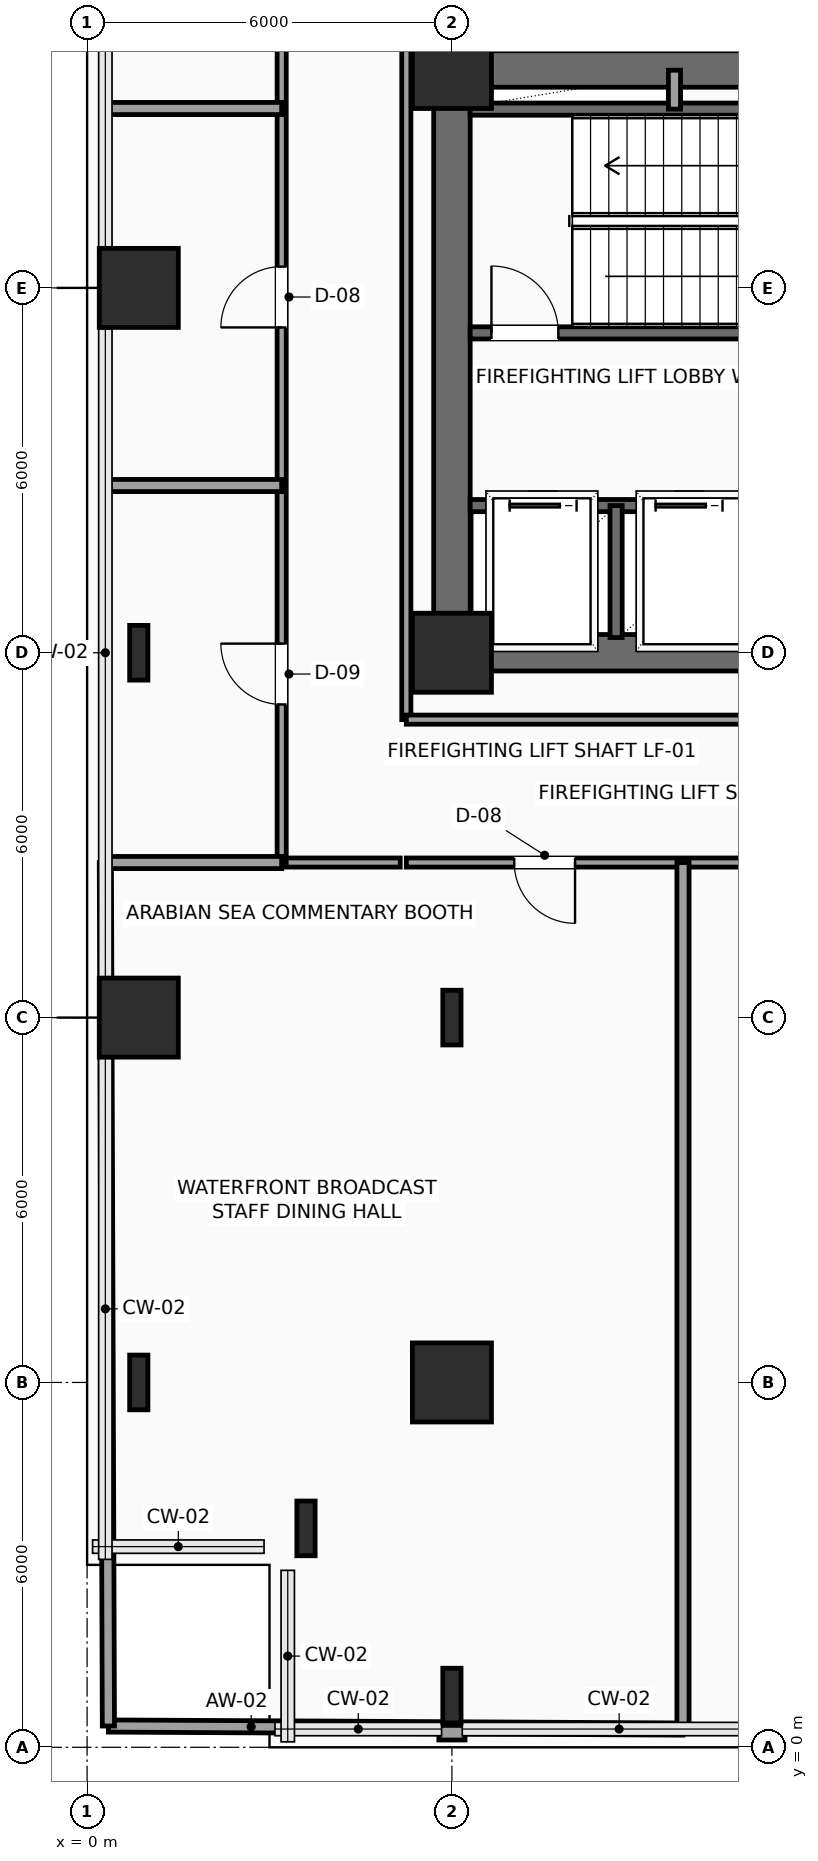
"""IFC4 building model, lengths in metres.
Left out: names, types, materials, properties, quantities, classifications, styles, units other than length and angle.
Written with IfcOpenShell. Run it as: python <this file> out.ifc"""

import sys

from ifc_helpers import new_model, si_unit, direction, frame, frame_2d, origin, origin_2d, place, context, subcontext, project, spatial, rectangle, i_section, extrude, element, fill, save


model = new_model("IFC4")
c1 = context("Model", 3, precision=1e-05, world=origin(), true_north=direction((0.0, 1.0)))
c2 = subcontext(c1, "Body", "Model", "MODEL_VIEW")
j1 = project(units=[si_unit("LENGTHUNIT", "METRE"), si_unit("PLANEANGLEUNIT", "RADIAN")], contexts=[c1])
p1 = place(None, origin())
s1 = spatial("IfcSite", under=j1, at=p1, CompositionType="ELEMENT")
p2 = place(p1, origin())
s2 = spatial("IfcBuilding", under=s1, at=p2, CompositionType="ELEMENT")
p3 = place(p2, frame((0.0, 0.0, 75.3)))
s3 = spatial("IfcBuildingStorey", under=s2, at=p3, CompositionType="ELEMENT", Elevation=75.3)
for number, where, z_axis, x_axis in (
    (1, (6.0, 18.0, 0.0), (0.0, 0.0, 1.0), (1.0, 0.0, 0.0)),
    (2, (6.0, 27.6, 0.0), (0.0, 0.0, 1.0), (1.0, 0.0, 0.0)),
):
    element("IfcColumn", number, at=place(p3, frame(where, z_axis=z_axis, x_axis=x_axis)), inside=s3, PredefinedType="COLUMN", context=c2, shape_type="SweptSolid", body=[
        extrude(rectangle(XDim=1.3, YDim=1.3, at=origin_2d()), origin(), (0.0, 0.0, 1.0), 3.9),
    ])
for number, where, z_axis, x_axis in (
    (3, (3.6, 3.6, 0.0), (0.0, 0.0, 1.0), (1.0, 0.0, 0.0)),
    (4, (0.85, 6.0, 0.0), (0.0, 0.0, 1.0), (1.0, 0.0, 0.0)),
):
    element("IfcColumn", number, at=place(p3, frame(where, z_axis=z_axis, x_axis=x_axis)), inside=s3, PredefinedType="COLUMN", context=c2, shape_type="SweptSolid", body=[
        extrude(i_section(OverallWidth=0.3, OverallDepth=0.9, WebThickness=0.019, FlangeThickness=0.035, FilletRadius=0.03, at=origin_2d()), origin(), (0.0, 0.0, 1.0), 3.9),
    ])
p4 = place(p3, frame((0.85, 12.0, 0.0), z_axis=(0.0, 0.0, 1.0), x_axis=(1.0, 0.0, 0.0)))
e5 = element("IfcColumn", 5, at=p4, inside=s3, PredefinedType="COLUMN", context=c2, shape_type="SweptSolid", body=[
    extrude(rectangle(XDim=1.3, YDim=1.3, at=origin_2d()), origin(), (0.0, 0.0, 1.0), 3.9),
])
p5 = place(p3, frame((0.85, 18.0, 0.0), z_axis=(0.0, 0.0, 1.0), x_axis=(1.0, 0.0, 0.0)))
e6 = element("IfcColumn", 6, at=p5, inside=s3, PredefinedType="COLUMN", context=c2, shape_type="SweptSolid", body=[
    extrude(i_section(OverallWidth=0.3, OverallDepth=0.9, WebThickness=0.019, FlangeThickness=0.035, FilletRadius=0.03, at=origin_2d()), origin(), (0.0, 0.0, 1.0), 3.9),
])
p6 = place(p3, frame((0.85, 24.0, 0.0), z_axis=(0.0, 0.0, 1.0), x_axis=(1.0, 0.0, 0.0)))
e7 = element("IfcColumn", 7, at=p6, inside=s3, PredefinedType="COLUMN", context=c2, shape_type="SweptSolid", body=[
    extrude(rectangle(XDim=1.3, YDim=1.3, at=origin_2d()), origin(), (0.0, 0.0, 1.0), 3.9),
])
p7 = place(p3, frame((6.0, 0.85, 0.0), z_axis=(0.0, 0.0, 1.0), x_axis=(1.0, 0.0, 0.0)))
e8 = element("IfcColumn", 8, at=p7, inside=s3, PredefinedType="COLUMN", context=c2, shape_type="SweptSolid", body=[
    extrude(i_section(OverallWidth=0.3, OverallDepth=0.9, WebThickness=0.019, FlangeThickness=0.035, FilletRadius=0.03, at=origin_2d()), origin(), (0.0, 0.0, 1.0), 3.9),
])
p8 = place(p3, frame((6.0, 6.0, 0.0), z_axis=(0.0, 0.0, 1.0), x_axis=(1.0, 0.0, 0.0)))
e9 = element("IfcColumn", 9, at=p8, inside=s3, PredefinedType="COLUMN", context=c2, shape_type="SweptSolid", body=[
    extrude(rectangle(XDim=1.3, YDim=1.3, at=origin_2d()), origin(), (0.0, 0.0, 1.0), 3.9),
])
p9 = place(p3, frame((6.0, 12.0, 0.0), z_axis=(0.0, 0.0, 1.0), x_axis=(1.0, 0.0, 0.0)))
e10 = element("IfcColumn", 10, at=p9, inside=s3, PredefinedType="COLUMN", context=c2, shape_type="SweptSolid", body=[
    extrude(i_section(OverallWidth=0.3, OverallDepth=0.9, WebThickness=0.019, FlangeThickness=0.035, FilletRadius=0.03, at=origin_2d()), origin(), (0.0, 0.0, 1.0), 3.9),
])
p10 = place(p3, frame((6.215, 0.24, 0.0), z_axis=(0.0, 0.0, 1.0), x_axis=(-1.0, 0.0, 0.0)))
e11 = element("IfcWall", 11, at=p10, inside=s3, PredefinedType="SOLIDWALL", context=c2, shape_type="SweptSolid", body=[
    extrude(rectangle(XDim=0.43, YDim=0.24, at=frame_2d((0.215, 0.0))), origin(), (0.0, 0.0, 1.0), 3.65),
])
p11 = place(p3, frame((6.0, 18.0, 0.0), z_axis=(0.0, 0.0, 1.0), x_axis=(1.0, 0.0, 0.0)))
e12 = element("IfcWall", 12, at=p11, inside=s3, PredefinedType="SHEAR", context=c2, shape_type="SweptSolid", body=[
    extrude(rectangle(XDim=12.0, YDim=0.6, at=frame_2d((6.0, 0.0))), origin(), (0.0, 0.0, 1.0), 3.65),
])
p12 = place(p11, frame((7.15, 0.0, 0.0)))
e13 = element("IfcOpeningElement", 13, at=p12, cuts=e12, PredefinedType="OPENING", context=c2, shape_type="SweptSolid", body=[
    extrude(rectangle(XDim=1.6, YDim=2.3, at=frame_2d((0.8, 1.15))), frame((0.0, 0.31, 0.0), z_axis=(0.0, -1.0, 0.0), x_axis=(1.0, 0.0, 0.0)), (0.0, 0.0, 1.0), 0.62),
])
p13 = place(p3, frame((6.0, 27.6, 0.0), z_axis=(0.0, 0.0, 1.0), x_axis=(1.0, 0.0, 0.0)))
e14 = element("IfcWall", 14, at=p13, inside=s3, PredefinedType="SHEAR", context=c2, shape_type="SweptSolid", body=[
    extrude(rectangle(XDim=12.0, YDim=0.6, at=frame_2d((6.0, 0.0))), origin(), (0.0, 0.0, 1.0), 3.65),
])
p14 = place(p13, frame((10.2, 0.0, 0.0)))
e15 = element("IfcOpeningElement", 15, at=p14, cuts=e14, PredefinedType="OPENING", context=c2, shape_type="SweptSolid", body=[
    extrude(rectangle(XDim=0.9, YDim=2.15, at=frame_2d((0.45, 1.075))), frame((0.0, 0.31, 0.0), z_axis=(0.0, -1.0, 0.0), x_axis=(1.0, 0.0, 0.0)), (0.0, 0.0, 1.0), 0.62),
])
p15 = place(p3, frame((6.0, 18.0, 0.0), z_axis=(0.0, 0.0, 1.0), x_axis=(0.0, 1.0, 0.0)))
e16 = element("IfcWall", 16, at=p15, inside=s3, PredefinedType="SHEAR", context=c2, shape_type="SweptSolid", body=[
    extrude(rectangle(XDim=9.6, YDim=0.6, at=frame_2d((4.8, 0.0))), origin(), (0.0, 0.0, 1.0), 3.65),
])
p16 = place(p3, frame((6.3, 23.26, 0.0), z_axis=(0.0, 0.0, 1.0), x_axis=(1.0, 0.0, 0.0)))
e17 = element("IfcWall", 17, at=p16, inside=s3, PredefinedType="SHEAR", context=c2, shape_type="SweptSolid", body=[
    extrude(rectangle(XDim=8.88, YDim=0.2, at=frame_2d((4.44, 0.0))), origin(), (0.0, 0.0, 1.0), 3.65),
])
p17 = place(p16, frame((0.35, 0.0, 0.0)))
e18 = element("IfcOpeningElement", 18, at=p17, cuts=e17, PredefinedType="OPENING", context=c2, shape_type="SweptSolid", body=[
    extrude(rectangle(XDim=1.1, YDim=2.2, at=frame_2d((0.55, 1.1))), frame((0.0, 0.11, 0.0), z_axis=(0.0, -1.0, 0.0), x_axis=(1.0, 0.0, 0.0)), (0.0, 0.0, 1.0), 0.22),
])
p18 = place(p3, frame((6.3, 26.94, 0.0), z_axis=(0.0, 0.0, 1.0), x_axis=(1.0, 0.0, 0.0)))
e19 = element("IfcWall", 19, at=p18, inside=s3, PredefinedType="SHEAR", context=c2, shape_type="SweptSolid", body=[
    extrude(rectangle(XDim=8.88, YDim=0.2, at=frame_2d((4.44, 0.0))), origin(), (0.0, 0.0, 1.0), 3.65),
])
p19 = place(p3, frame((6.3, 20.42, 0.0), z_axis=(0.0, 0.0, 1.0), x_axis=(1.0, 0.0, 0.0)))
e20 = element("IfcWall", 20, at=p19, inside=s3, PredefinedType="SHEAR", context=c2, shape_type="SweptSolid", body=[
    extrude(rectangle(XDim=4.95, YDim=0.2, at=frame_2d((2.475, 0.0))), origin(), (0.0, 0.0, 1.0), 3.65),
])
p20 = place(p19, frame((0.65, 0.0, 0.0)))
e21 = element("IfcOpeningElement", 21, at=p20, cuts=e20, PredefinedType="OPENING", context=c2, shape_type="SweptSolid", body=[
    extrude(rectangle(XDim=1.1, YDim=2.2, at=frame_2d((0.55, 1.1))), frame((0.0, 0.11, 0.0), z_axis=(0.0, -1.0, 0.0), x_axis=(1.0, 0.0, 0.0)), (0.0, 0.0, 1.0), 0.22),
])
p21 = place(p19, frame((3.05, 0.0, 0.0)))
e22 = element("IfcOpeningElement", 22, at=p21, cuts=e20, PredefinedType="OPENING", context=c2, shape_type="SweptSolid", body=[
    extrude(rectangle(XDim=1.1, YDim=2.2, at=frame_2d((0.55, 1.1))), frame((0.0, 0.11, 0.0), z_axis=(0.0, -1.0, 0.0), x_axis=(1.0, 0.0, 0.0)), (0.0, 0.0, 1.0), 0.22),
])
p22 = place(p3, frame((8.7, 18.25, 0.0), z_axis=(0.0, 0.0, 1.0), x_axis=(0.0, 1.0, 0.0)))
e23 = element("IfcWall", 23, at=p22, inside=s3, PredefinedType="SHEAR", context=c2, shape_type="SweptSolid", body=[
    extrude(rectangle(XDim=2.17, YDim=0.2, at=frame_2d((1.085, 0.0))), origin(), (0.0, 0.0, 1.0), 3.65),
])
p23 = place(p3, frame((9.66, 26.94, 0.0), z_axis=(0.0, 0.0, 1.0), x_axis=(0.0, 1.0, 0.0)))
e24 = element("IfcWall", 24, at=p23, inside=s3, PredefinedType="SOLIDWALL", context=c2, shape_type="SweptSolid", body=[
    extrude(rectangle(XDim=0.64, YDim=0.2, at=frame_2d((0.32, 0.0))), origin(), (0.0, 0.0, 1.0), 3.65),
])
p24 = place(p3, frame((12.4, 14.55, 0.0), z_axis=(0.0, 0.0, 1.0), x_axis=(-1.0, 0.0, 0.0)))
e25 = element("IfcWall", 25, at=p24, inside=s3, PredefinedType="PARTITIONING", context=c2, shape_type="SweptSolid", body=[
    extrude(rectangle(XDim=7.15, YDim=0.15, at=frame_2d((3.575, 0.0))), origin(), (0.0, 0.0, 1.0), 3.65),
])
p25 = place(p24, frame((4.375, 0.0, 0.0)))
e26 = element("IfcOpeningElement", 26, at=p25, cuts=e25, PredefinedType="OPENING", context=c2, shape_type="SweptSolid", body=[
    extrude(rectangle(XDim=1.0, YDim=2.2, at=frame_2d((0.5, 1.1))), frame((0.0, 0.085, 0.0), z_axis=(0.0, -1.0, 0.0), x_axis=(1.0, 0.0, 0.0)), (0.0, 0.0, 1.0), 0.17),
])
p26 = place(p3, frame((5.15, 14.55, 0.0), z_axis=(0.0, 0.0, 1.0), x_axis=(-1.0, 0.0, 0.0)))
e27 = element("IfcWall", 27, at=p26, inside=s3, PredefinedType="PARTITIONING", context=c2, shape_type="SweptSolid", body=[
    extrude(rectangle(XDim=1.95, YDim=0.15, at=frame_2d((0.975, 0.0))), origin(), (0.0, 0.0, 1.0), 3.65),
])
p27 = place(p3, frame((3.2, 14.55, 0.0), z_axis=(0.0, 0.0, 1.0), x_axis=(0.0, 1.0, 0.0)))
e28 = element("IfcWall", 28, at=p27, inside=s3, PredefinedType="PARTITIONING", context=c2, shape_type="SweptSolid", body=[
    extrude(rectangle(XDim=15.7, YDim=0.15, at=frame_2d((7.85, 0.0))), origin(), (0.0, 0.0, 1.0), 3.65),
])
p28 = place(p27, frame((2.6, 0.0, 0.0)))
e29 = element("IfcOpeningElement", 29, at=p28, cuts=e28, PredefinedType="OPENING", context=c2, shape_type="SweptSolid", body=[
    extrude(rectangle(XDim=1.0, YDim=2.2, at=frame_2d((0.5, 1.1))), frame((0.0, 0.085, 0.0), z_axis=(0.0, -1.0, 0.0), x_axis=(1.0, 0.0, 0.0)), (0.0, 0.0, 1.0), 0.17),
])
p29 = place(p27, frame((8.8, 0.0, 0.0)))
e30 = element("IfcOpeningElement", 30, at=p29, cuts=e28, PredefinedType="OPENING", context=c2, shape_type="SweptSolid", body=[
    extrude(rectangle(XDim=1.0, YDim=2.2, at=frame_2d((0.5, 1.1))), frame((0.0, 0.085, 0.0), z_axis=(0.0, -1.0, 0.0), x_axis=(1.0, 0.0, 0.0)), (0.0, 0.0, 1.0), 0.17),
])
p30 = place(p27, frame((13.55, 0.0, 0.0)))
e31 = element("IfcOpeningElement", 31, at=p30, cuts=e28, PredefinedType="OPENING", context=c2, shape_type="SweptSolid", body=[
    extrude(rectangle(XDim=1.0, YDim=2.2, at=frame_2d((0.5, 1.1))), frame((0.0, 0.085, 0.0), z_axis=(0.0, -1.0, 0.0), x_axis=(1.0, 0.0, 0.0)), (0.0, 0.0, 1.0), 0.17),
])
p31 = place(p3, frame((5.25, 30.25, 0.0), z_axis=(0.0, 0.0, 1.0), x_axis=(0.0, -1.0, 0.0)))
e32 = element("IfcWall", 32, at=p31, inside=s3, PredefinedType="PARTITIONING", context=c2, shape_type="SweptSolid", body=[
    extrude(rectangle(XDim=13.35, YDim=0.15, at=frame_2d((6.675, 0.0))), origin(), (0.0, 0.0, 1.0), 3.65),
])
p32 = place(p3, frame((5.25, 16.9, 0.0), z_axis=(0.0, 0.0, 1.0), x_axis=(1.0, 0.0, 0.0)))
e33 = element("IfcWall", 33, at=p32, inside=s3, PredefinedType="PARTITIONING", context=c2, shape_type="SweptSolid", body=[
    extrude(rectangle(XDim=7.15, YDim=0.15, at=frame_2d((3.575, 0.0))), origin(), (0.0, 0.0, 1.0), 3.65),
])
p33 = place(p3, frame((6.3, 27.68, 0.0), z_axis=(0.0, 0.0, 1.0), x_axis=(0.0, 1.0, 0.0)))
e34 = element("IfcWall", 34, at=p33, inside=s3, PredefinedType="PARTITIONING", context=c2, shape_type="SweptSolid", body=[
    extrude(rectangle(XDim=2.57, YDim=0.15, at=frame_2d((1.285, 0.0))), origin(), (0.0, 0.0, 1.0), 2.992),
])
p34 = place(p3, frame((0.35, 0.35, 0.0), z_axis=(0.0, 0.0, 1.0), x_axis=(0.99998595132, -0.005300675722, 0.0)))
e35 = element("IfcWall", 35, at=p34, inside=s3, PredefinedType="PARTITIONING", context=c2, shape_type="SweptSolid", body=[
    extrude(rectangle(XDim=5.435, YDim=0.2, at=frame_2d((2.717, 0.0))), origin(), (0.0, 0.0, 1.0), 3.65),
])
p35 = place(p3, frame((6.215, 0.319, 0.0), z_axis=(0.0, 0.0, 1.0), x_axis=(0.999985892136, -0.005311829174, 0.0)))
e36 = element("IfcWall", 36, at=p35, inside=s3, PredefinedType="PARTITIONING", context=c2, shape_type="SweptSolid", body=[
    extrude(rectangle(XDim=3.585, YDim=0.2, at=frame_2d((1.792, 0.0))), origin(), (0.0, 0.0, 1.0), 3.65),
])
p36 = place(p3, frame((0.35, 0.35, 0.0), z_axis=(0.0, 0.0, 1.0), x_axis=(-0.003524555588, 0.999993788735, 0.0)))
e37 = element("IfcWall", 37, at=p36, inside=s3, PredefinedType="PARTITIONING", context=c2, shape_type="SweptSolid", body=[
    extrude(rectangle(XDim=14.2, YDim=0.2, at=frame_2d((7.1, 0.0))), origin(), (0.0, 0.0, 1.0), 3.65),
])
p37 = place(p3, frame((9.8, 0.3, 0.0), z_axis=(0.0, 0.0, 1.0), x_axis=(0.0, 1.0, 0.0)))
e38 = element("IfcWall", 38, at=p37, inside=s3, PredefinedType="PARTITIONING", context=c2, shape_type="SweptSolid", body=[
    extrude(rectangle(XDim=14.25, YDim=0.2, at=frame_2d((7.125, 0.0))), origin(), (0.0, 0.0, 1.0), 3.65),
])
p38 = place(p3, frame((0.3, 14.55, 0.0), z_axis=(0.0, 0.0, 1.0), x_axis=(1.0, 0.0, 0.0)))
e39 = element("IfcWall", 39, at=p38, inside=s3, PredefinedType="PARTITIONING", context=c2, shape_type="SweptSolid", body=[
    extrude(rectangle(XDim=2.9, YDim=0.2, at=frame_2d((1.45, 0.0))), origin(), (0.0, 0.0, 1.0), 3.65),
])
p39 = place(p3, frame((0.3, 20.75, 0.0), z_axis=(0.0, 0.0, 1.0), x_axis=(1.0, 0.0, 0.0)))
e40 = element("IfcWall", 40, at=p39, inside=s3, PredefinedType="PARTITIONING", context=c2, shape_type="SweptSolid", body=[
    extrude(rectangle(XDim=2.9, YDim=0.2, at=frame_2d((1.45, 0.0))), origin(), (0.0, 0.0, 1.0), 3.142),
])
p40 = place(p3, frame((0.3, 26.95, 0.0), z_axis=(0.0, 0.0, 1.0), x_axis=(1.0, 0.0, 0.0)))
e41 = element("IfcWall", 41, at=p40, inside=s3, PredefinedType="PARTITIONING", context=c2, shape_type="SweptSolid", body=[
    extrude(rectangle(XDim=2.9, YDim=0.2, at=frame_2d((1.45, 0.0))), origin(), (0.0, 0.0, 1.0), 3.65),
])
p41 = place(p17, origin())
e42 = element("IfcDoor", 42, at=p41, inside=s3, OperationType="SINGLE_SWING_LEFT", PredefinedType="DOOR", context=c2, shape_type="SweptSolid", body=[
    extrude(rectangle(XDim=1.1, YDim=2.2, at=frame_2d((0.55, 1.1))), frame((0.0, 0.025, 0.0), z_axis=(0.0, -1.0, 0.0), x_axis=(1.0, 0.0, 0.0)), (0.0, 0.0, 1.0), 0.05),
])
fill(e18, e42)
p42 = place(p20, origin())
e43 = element("IfcDoor", 43, at=p42, inside=s3, OperationType="SLIDING_TO_LEFT", PredefinedType="DOOR", context=c2, shape_type="SweptSolid", body=[
    extrude(rectangle(XDim=1.1, YDim=2.2, at=frame_2d((0.55, 1.1))), frame((0.0, 0.025, 0.0), z_axis=(0.0, -1.0, 0.0), x_axis=(1.0, 0.0, 0.0)), (0.0, 0.0, 1.0), 0.05),
])
fill(e21, e43)
p43 = place(p21, origin())
e44 = element("IfcDoor", 44, at=p43, inside=s3, OperationType="SLIDING_TO_LEFT", PredefinedType="DOOR", context=c2, shape_type="SweptSolid", body=[
    extrude(rectangle(XDim=1.1, YDim=2.2, at=frame_2d((0.55, 1.1))), frame((0.0, 0.025, 0.0), z_axis=(0.0, -1.0, 0.0), x_axis=(1.0, 0.0, 0.0)), (0.0, 0.0, 1.0), 0.05),
])
fill(e22, e44)
p44 = place(p25, origin())
e45 = element("IfcDoor", 45, at=p44, inside=s3, OperationType="SINGLE_SWING_LEFT", PredefinedType="DOOR", context=c2, shape_type="SweptSolid", body=[
    extrude(rectangle(XDim=1.0, YDim=2.2, at=frame_2d((0.5, 1.1))), frame((0.0, 0.025, 0.0), z_axis=(0.0, -1.0, 0.0), x_axis=(1.0, 0.0, 0.0)), (0.0, 0.0, 1.0), 0.05),
])
fill(e26, e45)
p45 = place(p28, origin())
e46 = element("IfcDoor", 46, at=p45, inside=s3, OperationType="SINGLE_SWING_RIGHT", PredefinedType="DOOR", context=c2, shape_type="SweptSolid", body=[
    extrude(rectangle(XDim=1.0, YDim=2.2, at=frame_2d((0.5, 1.1))), frame((0.0, 0.025, 0.0), z_axis=(0.0, -1.0, 0.0), x_axis=(1.0, 0.0, 0.0)), (0.0, 0.0, 1.0), 0.05),
])
fill(e29, e46)
p46 = place(p29, origin())
e47 = element("IfcDoor", 47, at=p46, inside=s3, OperationType="SINGLE_SWING_LEFT", PredefinedType="DOOR", context=c2, shape_type="SweptSolid", body=[
    extrude(rectangle(XDim=1.0, YDim=2.2, at=frame_2d((0.5, 1.1))), frame((0.0, 0.025, 0.0), z_axis=(0.0, -1.0, 0.0), x_axis=(1.0, 0.0, 0.0)), (0.0, 0.0, 1.0), 0.05),
])
fill(e30, e47)
save(model, sys.argv[1])
